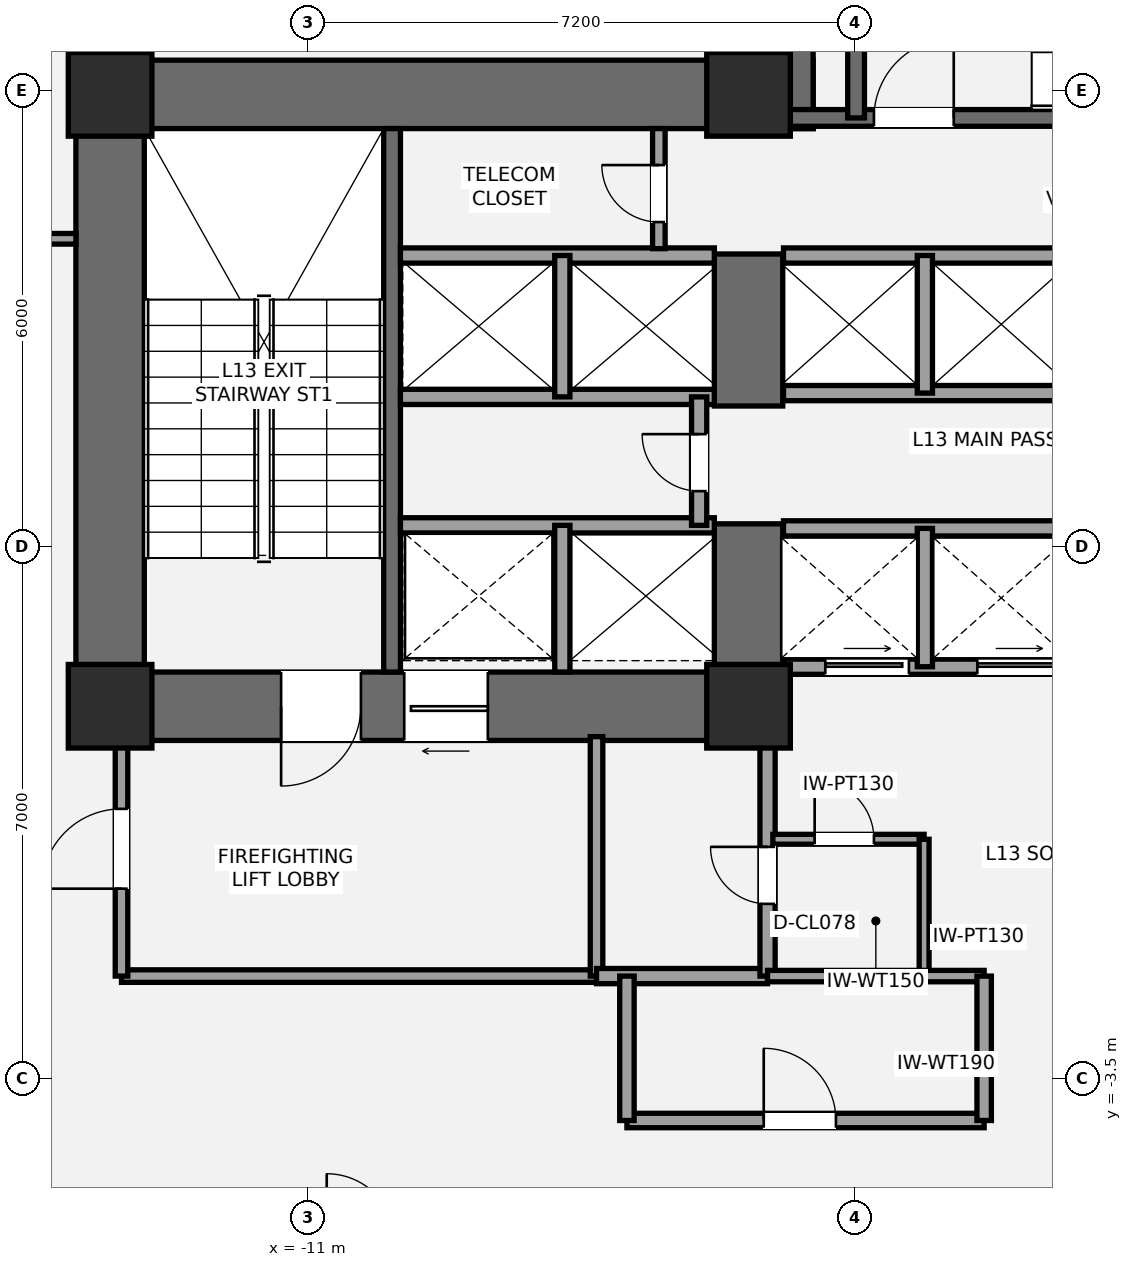
"""IFC4 building model, lengths in metres.
Left out: names, types, materials, properties, quantities, classifications, styles, units other than length and angle.
Written with IfcOpenShell. Run it as: python <this file> out.ifc"""

import sys

from ifc_helpers import new_model, si_unit, direction, frame, frame_2d, origin, origin_2d, place, context, subcontext, project, spatial, rectangle, extrude, element, fill, save


model = new_model("IFC4")
c1 = context("Model", 3, precision=1e-05, world=origin(), true_north=direction((0.0, 1.0)))
c2 = subcontext(c1, "Body", "Model", "MODEL_VIEW")
j1 = project(units=[si_unit("LENGTHUNIT", "METRE"), si_unit("PLANEANGLEUNIT", "RADIAN")], contexts=[c1])
p1 = place(None, origin())
s1 = spatial("IfcSite", under=j1, at=p1, CompositionType="ELEMENT")
p2 = place(p1, origin())
s2 = spatial("IfcBuilding", under=s1, at=p2, CompositionType="ELEMENT")
p3 = place(p2, frame((0.0, 0.0, 52.2)))
s3 = spatial("IfcBuildingStorey", under=s2, at=p3, CompositionType="ELEMENT", Elevation=52.2)
p4 = place(p3, frame((-13.6, 0.95, 0.0), z_axis=(0.0, 0.0, 1.0), x_axis=(0.0, 1.0, 0.0)))
e1 = element("IfcWall", 1, at=p4, inside=s3, PredefinedType="SHEAR", context=c2, shape_type="SweptSolid", body=[
    extrude(rectangle(XDim=8.95, YDim=0.9, at=frame_2d((4.475, 0.0))), origin(), (0.0, 0.0, 1.0), 3.6),
])
p5 = place(p3, frame((-14.05, 9.45, 0.0), z_axis=(0.0, 0.0, 1.0), x_axis=(1.0, 0.0, 0.0)))
e2 = element("IfcWall", 2, at=p5, inside=s3, PredefinedType="SHEAR", context=c2, shape_type="SweptSolid", body=[
    extrude(rectangle(XDim=9.7, YDim=0.9, at=frame_2d((4.85, 0.0))), origin(), (0.0, 0.0, 1.0), 3.6),
])
p6 = place(p3, frame((-4.75, 1.4, 0.0), z_axis=(0.0, 0.0, 1.0), x_axis=(-1.0, 0.0, 0.0)))
e3 = element("IfcWall", 3, at=p6, inside=s3, PredefinedType="SHEAR", context=c2, shape_type="SweptSolid", body=[
    extrude(rectangle(XDim=9.3, YDim=0.9, at=frame_2d((4.65, 0.0))), origin(), (0.0, 0.0, 1.0), 3.6),
])
p7 = place(p6, frame((5.55, 0.0, 0.0)))
e4 = element("IfcOpeningElement", 4, at=p7, cuts=e3, PredefinedType="OPENING", context=c2, shape_type="SweptSolid", body=[
    extrude(rectangle(XDim=1.05, YDim=2.15, at=frame_2d((0.525, 1.075))), frame((0.0, 0.46, 0.0), z_axis=(0.0, -1.0, 0.0), x_axis=(1.0, 0.0, 0.0)), (0.0, 0.0, 1.0), 0.92),
])
p8 = place(p6, frame((3.88, 0.0, 0.0)))
e5 = element("IfcOpeningElement", 5, at=p8, cuts=e3, PredefinedType="OPENING", context=c2, shape_type="SweptSolid", body=[
    extrude(rectangle(XDim=1.1, YDim=2.2, at=frame_2d((0.55, 1.1))), frame((0.0, 0.46, 0.0), z_axis=(0.0, -1.0, 0.0), x_axis=(1.0, 0.0, 0.0)), (0.0, 0.0, 1.0), 0.92),
])
p9 = place(p3, frame((-5.2, 0.95, 0.0), z_axis=(0.0, 0.0, 1.0), x_axis=(0.0, 1.0, 0.0)))
e6 = element("IfcWall", 6, at=p9, inside=s3, PredefinedType="SHEAR", context=c2, shape_type="SweptSolid", body=[
    extrude(rectangle(XDim=2.85, YDim=0.9, at=frame_2d((1.425, 0.0))), origin(), (0.0, 0.0, 1.0), 3.6),
])
p10 = place(p3, frame((-5.2, 5.35, 0.0), z_axis=(0.0, 0.0, 1.0), x_axis=(0.0, 1.0, 0.0)))
e7 = element("IfcWall", 7, at=p10, inside=s3, PredefinedType="SHEAR", context=c2, shape_type="SweptSolid", body=[
    extrude(rectangle(XDim=2.0, YDim=0.9, at=frame_2d((1.0, 0.0))), origin(), (0.0, 0.0, 1.0), 3.6),
])
p11 = place(p3, frame((-9.89, 1.85, 0.0), z_axis=(0.0, 0.0, 1.0), x_axis=(0.0, 1.0, 0.0)))
e8 = element("IfcWall", 8, at=p11, inside=s3, PredefinedType="SHEAR", context=c2, shape_type="SweptSolid", body=[
    extrude(rectangle(XDim=7.15, YDim=0.22, at=frame_2d((3.575, 0.0))), origin(), (0.0, 0.0, 1.0), 3.6),
])
p12 = place(p3, frame((-4.8, 9.0, 0.0), z_axis=(0.0, 0.0, 1.0), x_axis=(0.0, 1.0, 0.0)))
e9 = element("IfcWall", 9, at=p12, inside=s3, PredefinedType="SHEAR", context=c2, shape_type="SweptSolid", body=[
    extrude(rectangle(XDim=4.3, YDim=0.9, at=frame_2d((2.15, 0.0))), origin(), (0.0, 0.0, 1.0), 3.6),
])
p13 = place(p3, frame((-4.7, 9.14, 0.0), z_axis=(0.0, 0.0, 1.0), x_axis=(1.0, 0.0, 0.0)))
e10 = element("IfcWall", 10, at=p13, inside=s3, PredefinedType="SHEAR", context=c2, shape_type="SweptSolid", body=[
    extrude(rectangle(XDim=9.3, YDim=0.22, at=frame_2d((4.65, 0.0))), origin(), (0.0, 0.0, 1.0), 3.6),
])
p14 = place(p13, frame((1.15, 0.0, 0.0)))
e11 = element("IfcOpeningElement", 11, at=p14, cuts=e10, PredefinedType="OPENING", context=c2, shape_type="SweptSolid", body=[
    extrude(rectangle(XDim=1.05, YDim=2.15, at=frame_2d((0.525, 1.075))), frame((0.0, 0.12, 0.0), z_axis=(0.0, -1.0, 0.0), x_axis=(1.0, 0.0, 0.0)), (0.0, 0.0, 1.0), 0.24),
])
p15 = place(p3, frame((-3.785, 9.14, 0.0), z_axis=(0.0, 0.0, 1.0), x_axis=(0.0, 1.0, 0.0)))
e12 = element("IfcWall", 12, at=p15, inside=s3, PredefinedType="SHEAR", context=c2, shape_type="SweptSolid", body=[
    extrude(rectangle(XDim=3.26, YDim=0.22, at=frame_2d((1.63, 0.0))), origin(), (0.0, 0.0, 1.0), 3.6),
])
for number, where, z_axis, x_axis in (
    (13, (-13.6, 1.4, 0.0), (0.0, 0.0, 1.0), (1.0, 0.0, 0.0)),
    (14, (-13.6, 9.45, 0.0), (0.0, 0.0, 1.0), (1.0, 0.0, 0.0)),
    (15, (-5.2, 1.4, 0.0), (0.0, 0.0, 1.0), (1.0, 0.0, 0.0)),
    (16, (-5.2, 9.45, 0.0), (0.0, 0.0, 1.0), (1.0, 0.0, 0.0)),
):
    element("IfcColumn", number, at=place(p3, frame(where, z_axis=z_axis, x_axis=x_axis)), inside=s3, PredefinedType="COLUMN", context=c2, shape_type="SweptSolid", body=[
        extrude(rectangle(XDim=1.1, YDim=1.1, at=origin_2d()), origin(), (0.0, 0.0, 1.0), 3.6),
    ])
p16 = place(p3, frame((-13.45, -2.15, 0.0), z_axis=(0.0, 0.0, 1.0), x_axis=(1.0, 0.0, 0.0)))
e17 = element("IfcWall", 17, at=p16, inside=s3, PredefinedType="PARTITIONING", context=c2, shape_type="SweptSolid", body=[
    extrude(rectangle(XDim=6.25, YDim=0.165, at=frame_2d((3.125, 0.0))), origin(), (0.0, 0.0, 1.0), 3.4),
])
p17 = place(p3, frame((-13.45, -2.15, 0.0), z_axis=(0.0, 0.0, 1.0), x_axis=(0.0, 1.0, 0.0)))
e18 = element("IfcWall", 18, at=p17, inside=s3, PredefinedType="PARTITIONING", context=c2, shape_type="SweptSolid", body=[
    extrude(rectangle(XDim=3.15, YDim=0.165, at=frame_2d((1.575, 0.0))), origin(), (0.0, 0.0, 1.0), 2.853),
])
p18 = place(p17, frame((1.15, 0.0, 0.0)))
e19 = element("IfcOpeningElement", 19, at=p18, cuts=e18, PredefinedType="OPENING", context=c2, shape_type="SweptSolid", body=[
    extrude(rectangle(XDim=1.05, YDim=2.15, at=frame_2d((0.525, 1.075))), frame((0.0, 0.093, 0.0), z_axis=(0.0, -1.0, 0.0), x_axis=(1.0, 0.0, 0.0)), (0.0, 0.0, 1.0), 0.185),
])
p19 = place(p3, frame((-7.2, -2.15, 0.0), z_axis=(0.0, 0.0, 1.0), x_axis=(0.0, 1.0, 0.0)))
e20 = element("IfcWall", 20, at=p19, inside=s3, PredefinedType="PARTITIONING", context=c2, shape_type="SweptSolid", body=[
    extrude(rectangle(XDim=3.15, YDim=0.165, at=frame_2d((1.575, 0.0))), origin(), (0.0, 0.0, 1.0), 2.853),
])
p20 = place(p3, frame((-7.2, -2.15, 0.0), z_axis=(0.0, 0.0, 1.0), x_axis=(1.0, 0.0, 0.0)))
e21 = element("IfcWall", 21, at=p20, inside=s3, PredefinedType="SOLIDWALL", context=c2, shape_type="SweptSolid", body=[
    extrude(rectangle(XDim=2.25, YDim=0.2, at=frame_2d((1.125, 0.0))), origin(), (0.0, 0.0, 1.0), 3.4),
])
p21 = place(p3, frame((-4.95, -2.15, 0.0), z_axis=(0.0, 0.0, 1.0), x_axis=(0.0, 1.0, 0.0)))
e22 = element("IfcWall", 22, at=p21, inside=s3, PredefinedType="SOLIDWALL", context=c2, shape_type="SweptSolid", body=[
    extrude(rectangle(XDim=3.15, YDim=0.2, at=frame_2d((1.575, 0.0))), origin(), (0.0, 0.0, 1.0), 2.853),
])
p22 = place(p21, frame((0.95, 0.0, 0.0)))
e23 = element("IfcOpeningElement", 23, at=p22, cuts=e22, PredefinedType="OPENING", context=c2, shape_type="SweptSolid", body=[
    extrude(rectangle(XDim=0.75, YDim=2.1, at=frame_2d((0.375, 1.05))), frame((0.0, 0.11, 0.0), z_axis=(0.0, -1.0, 0.0), x_axis=(1.0, 0.0, 0.0)), (0.0, 0.0, 1.0), 0.22),
])
p23 = place(p3, frame((-4.88, -0.35, 0.0), z_axis=(0.0, 0.0, 1.0), x_axis=(1.0, 0.0, 0.0)))
e24 = element("IfcWall", 24, at=p23, inside=s3, PredefinedType="PARTITIONING", context=c2, shape_type="SweptSolid", body=[
    extrude(rectangle(XDim=1.99, YDim=0.13, at=frame_2d((0.995, 0.0))), origin(), (0.0, 0.0, 1.0), 3.4),
])
p24 = place(p23, frame((0.55, 0.0, 0.0)))
e25 = element("IfcOpeningElement", 25, at=p24, cuts=e24, PredefinedType="OPENING", context=c2, shape_type="SweptSolid", body=[
    extrude(rectangle(XDim=0.78, YDim=2.1, at=frame_2d((0.39, 1.05))), frame((0.0, 0.075, 0.0), z_axis=(0.0, -1.0, 0.0), x_axis=(1.0, 0.0, 0.0)), (0.0, 0.0, 1.0), 0.15),
])
p25 = place(p3, frame((-2.89, -2.15, 0.0), z_axis=(0.0, 0.0, 1.0), x_axis=(0.0, 1.0, 0.0)))
e26 = element("IfcWall", 26, at=p25, inside=s3, PredefinedType="PARTITIONING", context=c2, shape_type="SweptSolid", body=[
    extrude(rectangle(XDim=1.8, YDim=0.13, at=frame_2d((0.9, 0.0))), origin(), (0.0, 0.0, 1.0), 2.853),
])
p26 = place(p3, frame((-9.78, 3.78, 0.0), z_axis=(0.0, 0.0, 1.0), x_axis=(1.0, 0.0, 0.0)))
e27 = element("IfcWall", 27, at=p26, inside=s3, PredefinedType="SOLIDWALL", context=c2, shape_type="SweptSolid", body=[
    extrude(rectangle(XDim=4.13, YDim=0.2, at=frame_2d((2.065, 0.0))), origin(), (0.0, 0.0, 1.0), 3.4),
])
p27 = place(p3, frame((-7.65, 1.85, 0.0), z_axis=(0.0, 0.0, 1.0), x_axis=(0.0, 1.0, 0.0)))
e28 = element("IfcWall", 28, at=p27, inside=s3, PredefinedType="SOLIDWALL", context=c2, shape_type="SweptSolid", body=[
    extrude(rectangle(XDim=1.93, YDim=0.2, at=frame_2d((0.965, 0.0))), origin(), (0.0, 0.0, 1.0), 3.4),
])
for number, where, z_axis, x_axis in (
    (29, (-9.78, 5.47, 0.0), (0.0, 0.0, 1.0), (1.0, 0.0, 0.0)),
    (30, (-9.78, 7.33, 0.0), (0.0, 0.0, 1.0), (1.0, 0.0, 0.0)),
):
    element("IfcWall", number, at=place(p3, frame(where, z_axis=z_axis, x_axis=x_axis)), inside=s3, PredefinedType="SOLIDWALL", context=c2, shape_type="SweptSolid", body=[
        extrude(rectangle(XDim=4.13, YDim=0.2, at=frame_2d((2.065, 0.0))), origin(), (0.0, 0.0, 1.0), 3.4),
    ])
p28 = place(p3, frame((-7.65, 5.47, 0.0), z_axis=(0.0, 0.0, 1.0), x_axis=(0.0, 1.0, 0.0)))
e31 = element("IfcWall", 31, at=p28, inside=s3, PredefinedType="SOLIDWALL", context=c2, shape_type="SweptSolid", body=[
    extrude(rectangle(XDim=1.86, YDim=0.2, at=frame_2d((0.93, 0.0))), origin(), (0.0, 0.0, 1.0), 3.4),
])
p29 = place(p3, frame((-5.85, 3.78, 0.0), z_axis=(0.0, 0.0, 1.0), x_axis=(0.0, 1.0, 0.0)))
e32 = element("IfcWall", 32, at=p29, inside=s3, PredefinedType="SOLIDWALL", context=c2, shape_type="SweptSolid", body=[
    extrude(rectangle(XDim=1.69, YDim=0.2, at=frame_2d((0.845, 0.0))), origin(), (0.0, 0.0, 1.0), 3.4),
])
p30 = place(p29, frame((0.45, 0.0, 0.0)))
e33 = element("IfcOpeningElement", 33, at=p30, cuts=e32, PredefinedType="OPENING", context=c2, shape_type="SweptSolid", body=[
    extrude(rectangle(XDim=0.75, YDim=2.1, at=frame_2d((0.375, 1.05))), frame((0.0, 0.11, 0.0), z_axis=(0.0, -1.0, 0.0), x_axis=(1.0, 0.0, 0.0)), (0.0, 0.0, 1.0), 0.22),
])
p31 = place(p3, frame((-4.74, 1.92, 0.0), z_axis=(0.0, 0.0, 1.0), x_axis=(1.0, 0.0, 0.0)))
e34 = element("IfcWall", 34, at=p31, inside=s3, PredefinedType="SOLIDWALL", context=c2, shape_type="SweptSolid", body=[
    extrude(rectangle(XDim=3.86, YDim=0.2, at=frame_2d((1.93, 0.0))), origin(), (0.0, 0.0, 1.0), 2.39),
])
p32 = place(p31, frame((0.55, 0.0, 0.0)))
e35 = element("IfcOpeningElement", 35, at=p32, cuts=e34, PredefinedType="OPENING", context=c2, shape_type="SweptSolid", body=[
    extrude(rectangle(XDim=1.1, YDim=2.2, at=frame_2d((0.55, 1.1))), frame((0.0, 0.11, 0.0), z_axis=(0.0, -1.0, 0.0), x_axis=(1.0, 0.0, 0.0)), (0.0, 0.0, 1.0), 0.22),
])
p33 = place(p31, frame((2.55, 0.0, 0.0)))
e36 = element("IfcOpeningElement", 36, at=p33, cuts=e34, PredefinedType="OPENING", context=c2, shape_type="SweptSolid", body=[
    extrude(rectangle(XDim=1.1, YDim=2.2, at=frame_2d((0.55, 1.1))), frame((0.0, 0.11, 0.0), z_axis=(0.0, -1.0, 0.0), x_axis=(1.0, 0.0, 0.0)), (0.0, 0.0, 1.0), 0.22),
])
p34 = place(p3, frame((-4.74, 3.74, 0.0), z_axis=(0.0, 0.0, 1.0), x_axis=(1.0, 0.0, 0.0)))
e37 = element("IfcWall", 37, at=p34, inside=s3, PredefinedType="SOLIDWALL", context=c2, shape_type="SweptSolid", body=[
    extrude(rectangle(XDim=3.86, YDim=0.2, at=frame_2d((1.93, 0.0))), origin(), (0.0, 0.0, 1.0), 3.4),
])
p35 = place(p3, frame((-2.88, 1.92, 0.0), z_axis=(0.0, 0.0, 1.0), x_axis=(0.0, 1.0, 0.0)))
e38 = element("IfcWall", 38, at=p35, inside=s3, PredefinedType="SOLIDWALL", context=c2, shape_type="SweptSolid", body=[
    extrude(rectangle(XDim=1.82, YDim=0.2, at=frame_2d((0.91, 0.0))), origin(), (0.0, 0.0, 1.0), 3.4),
])
for number, where, z_axis, x_axis in (
    (39, (-4.74, 5.52, 0.0), (0.0, 0.0, 1.0), (1.0, 0.0, 0.0)),
    (40, (-4.74, 7.33, 0.0), (0.0, 0.0, 1.0), (1.0, 0.0, 0.0)),
):
    element("IfcWall", number, at=place(p3, frame(where, z_axis=z_axis, x_axis=x_axis)), inside=s3, PredefinedType="SOLIDWALL", context=c2, shape_type="SweptSolid", body=[
        extrude(rectangle(XDim=3.86, YDim=0.2, at=frame_2d((1.93, 0.0))), origin(), (0.0, 0.0, 1.0), 3.4),
    ])
p36 = place(p3, frame((-2.88, 5.52, 0.0), z_axis=(0.0, 0.0, 1.0), x_axis=(0.0, 1.0, 0.0)))
e41 = element("IfcWall", 41, at=p36, inside=s3, PredefinedType="SOLIDWALL", context=c2, shape_type="SweptSolid", body=[
    extrude(rectangle(XDim=1.81, YDim=0.2, at=frame_2d((0.905, 0.0))), origin(), (0.0, 0.0, 1.0), 3.4),
])
p37 = place(p3, frame((-6.38, 7.42, 0.0), z_axis=(0.0, 0.0, 1.0), x_axis=(0.0, 1.0, 0.0)))
e42 = element("IfcWall", 42, at=p37, inside=s3, PredefinedType="PARTITIONING", context=c2, shape_type="SweptSolid", body=[
    extrude(rectangle(XDim=1.58, YDim=0.165, at=frame_2d((0.79, 0.0))), origin(), (0.0, 0.0, 1.0), 3.4),
])
p38 = place(p37, frame((0.35, 0.0, 0.0)))
e43 = element("IfcOpeningElement", 43, at=p38, cuts=e42, PredefinedType="OPENING", context=c2, shape_type="SweptSolid", body=[
    extrude(rectangle(XDim=0.75, YDim=2.1, at=frame_2d((0.375, 1.05))), frame((0.0, 0.093, 0.0), z_axis=(0.0, -1.0, 0.0), x_axis=(1.0, 0.0, 0.0)), (0.0, 0.0, 1.0), 0.185),
])
p39 = place(p3, frame((-6.8, -4.05, 0.0), z_axis=(0.0, 0.0, 1.0), x_axis=(1.0, 0.0, 0.0)))
e44 = element("IfcWall", 44, at=p39, inside=s3, PredefinedType="PLUMBINGWALL", context=c2, shape_type="SweptSolid", body=[
    extrude(rectangle(XDim=4.7, YDim=0.19, at=frame_2d((2.35, 0.0))), origin(), (0.0, 0.0, 1.0), 3.4),
])
p40 = place(p39, frame((1.8, 0.0, 0.0)))
e45 = element("IfcOpeningElement", 45, at=p40, cuts=e44, PredefinedType="OPENING", context=c2, shape_type="SweptSolid", body=[
    extrude(rectangle(XDim=0.95, YDim=2.15, at=frame_2d((0.475, 1.075))), frame((0.0, 0.105, 0.0), z_axis=(0.0, -1.0, 0.0), x_axis=(1.0, 0.0, 0.0)), (0.0, 0.0, 1.0), 0.21),
])
p41 = place(p3, frame((-4.95, -2.15, 0.0), z_axis=(0.0, 0.0, 1.0), x_axis=(1.0, 0.0, 0.0)))
e46 = element("IfcWall", 46, at=p41, inside=s3, PredefinedType="PLUMBINGWALL", context=c2, shape_type="SweptSolid", body=[
    extrude(rectangle(XDim=2.85, YDim=0.15, at=frame_2d((1.425, 0.0))), origin(), (0.0, 0.0, 1.0), 3.4),
])
p42 = place(p3, frame((-6.8, -4.05, 0.0), z_axis=(0.0, 0.0, 1.0), x_axis=(0.0, 1.0, 0.0)))
e47 = element("IfcWall", 47, at=p42, inside=s3, PredefinedType="PLUMBINGWALL", context=c2, shape_type="SweptSolid", body=[
    extrude(rectangle(XDim=1.9, YDim=0.19, at=frame_2d((0.95, 0.0))), origin(), (0.0, 0.0, 1.0), 3.4),
])
p43 = place(p3, frame((-2.1, -4.05, 0.0), z_axis=(0.0, 0.0, 1.0), x_axis=(0.0, 1.0, 0.0)))
e48 = element("IfcWall", 48, at=p43, inside=s3, PredefinedType="PLUMBINGWALL", context=c2, shape_type="SweptSolid", body=[
    extrude(rectangle(XDim=1.9, YDim=0.19, at=frame_2d((0.95, 0.0))), origin(), (0.0, 0.0, 1.0), 2.853),
])
p44 = place(p3, frame((-24.856, 7.55, 0.0), z_axis=(0.0, 0.0, 1.0), x_axis=(1.0, 0.0, 0.0)))
e49 = element("IfcWall", 49, at=p44, inside=s3, PredefinedType="PARTITIONING", context=c2, shape_type="SweptSolid", body=[
    extrude(rectangle(XDim=10.806, YDim=0.14, at=frame_2d((5.403, 0.0))), origin(), (0.0, 0.0, 1.0), 2.853),
])
p45 = place(p44, frame((1.939, 0.0, 0.0)))
e50 = element("IfcOpeningElement", 50, at=p45, cuts=e49, PredefinedType="OPENING", context=c2, shape_type="SweptSolid", body=[
    extrude(rectangle(XDim=0.92, YDim=2.15, at=frame_2d((0.46, 1.075))), frame((0.0, 0.08, 0.0), z_axis=(0.0, -1.0, 0.0), x_axis=(1.0, 0.0, 0.0)), (0.0, 0.0, 1.0), 0.16),
])
p46 = place(p7, origin())
e51 = element("IfcDoor", 51, at=p46, inside=s3, OperationType="SINGLE_SWING_RIGHT", PredefinedType="DOOR", context=c2, shape_type="SweptSolid", body=[
    extrude(rectangle(XDim=1.05, YDim=2.15, at=frame_2d((0.525, 1.075))), frame((0.0, 0.025, 0.0), z_axis=(0.0, -1.0, 0.0), x_axis=(1.0, 0.0, 0.0)), (0.0, 0.0, 1.0), 0.05),
])
fill(e4, e51)
p47 = place(p14, origin())
e52 = element("IfcDoor", 52, at=p47, inside=s3, OperationType="SINGLE_SWING_RIGHT", PredefinedType="DOOR", context=c2, shape_type="SweptSolid", body=[
    extrude(rectangle(XDim=1.05, YDim=2.15, at=frame_2d((0.525, 1.075))), frame((0.0, 0.025, 0.0), z_axis=(0.0, -1.0, 0.0), x_axis=(1.0, 0.0, 0.0)), (0.0, 0.0, 1.0), 0.05),
])
fill(e11, e52)
p48 = place(p18, origin())
e53 = element("IfcDoor", 53, at=p48, inside=s3, OperationType="SINGLE_SWING_LEFT", PredefinedType="DOOR", context=c2, shape_type="SweptSolid", body=[
    extrude(rectangle(XDim=1.05, YDim=2.15, at=frame_2d((0.525, 1.075))), frame((0.0, 0.025, 0.0), z_axis=(0.0, -1.0, 0.0), x_axis=(1.0, 0.0, 0.0)), (0.0, 0.0, 1.0), 0.05),
])
fill(e19, e53)
p49 = place(p22, origin())
e54 = element("IfcDoor", 54, at=p49, inside=s3, OperationType="SINGLE_SWING_RIGHT", PredefinedType="DOOR", context=c2, shape_type="SweptSolid", body=[
    extrude(rectangle(XDim=0.75, YDim=2.1, at=frame_2d((0.375, 1.05))), frame((0.0, 0.025, 0.0), z_axis=(0.0, -1.0, 0.0), x_axis=(1.0, 0.0, 0.0)), (0.0, 0.0, 1.0), 0.05),
])
fill(e23, e54)
p50 = place(p24, origin())
e55 = element("IfcDoor", 55, at=p50, inside=s3, OperationType="SINGLE_SWING_LEFT", PredefinedType="DOOR", context=c2, shape_type="SweptSolid", body=[
    extrude(rectangle(XDim=0.78, YDim=2.1, at=frame_2d((0.39, 1.05))), frame((0.0, 0.025, 0.0), z_axis=(0.0, -1.0, 0.0), x_axis=(1.0, 0.0, 0.0)), (0.0, 0.0, 1.0), 0.05),
])
fill(e25, e55)
p51 = place(p8, origin())
e56 = element("IfcDoor", 56, at=p51, inside=s3, OperationType="SLIDING_TO_LEFT", PredefinedType="DOOR", context=c2, shape_type="SweptSolid", body=[
    extrude(rectangle(XDim=1.1, YDim=2.2, at=frame_2d((0.55, 1.1))), frame((0.0, 0.025, 0.0), z_axis=(0.0, -1.0, 0.0), x_axis=(1.0, 0.0, 0.0)), (0.0, 0.0, 1.0), 0.05),
])
fill(e5, e56)
p52 = place(p30, origin())
e57 = element("IfcDoor", 57, at=p52, inside=s3, OperationType="SINGLE_SWING_RIGHT", PredefinedType="DOOR", context=c2, shape_type="SweptSolid", body=[
    extrude(rectangle(XDim=0.75, YDim=2.1, at=frame_2d((0.375, 1.05))), frame((0.0, 0.025, 0.0), z_axis=(0.0, -1.0, 0.0), x_axis=(1.0, 0.0, 0.0)), (0.0, 0.0, 1.0), 0.05),
])
fill(e33, e57)
p53 = place(p32, origin())
e58 = element("IfcDoor", 58, at=p53, inside=s3, OperationType="SLIDING_TO_LEFT", PredefinedType="DOOR", context=c2, shape_type="SweptSolid", body=[
    extrude(rectangle(XDim=1.1, YDim=2.2, at=frame_2d((0.55, 1.1))), frame((0.0, 0.025, 0.0), z_axis=(0.0, -1.0, 0.0), x_axis=(1.0, 0.0, 0.0)), (0.0, 0.0, 1.0), 0.05),
])
fill(e35, e58)
p54 = place(p33, origin())
e59 = element("IfcDoor", 59, at=p54, inside=s3, OperationType="SLIDING_TO_LEFT", PredefinedType="DOOR", context=c2, shape_type="SweptSolid", body=[
    extrude(rectangle(XDim=1.1, YDim=2.2, at=frame_2d((0.55, 1.1))), frame((0.0, 0.025, 0.0), z_axis=(0.0, -1.0, 0.0), x_axis=(1.0, 0.0, 0.0)), (0.0, 0.0, 1.0), 0.05),
])
fill(e36, e59)
p55 = place(p38, origin())
e60 = element("IfcDoor", 60, at=p55, inside=s3, OperationType="SINGLE_SWING_RIGHT", PredefinedType="DOOR", context=c2, shape_type="SweptSolid", body=[
    extrude(rectangle(XDim=0.75, YDim=2.1, at=frame_2d((0.375, 1.05))), frame((0.0, 0.025, 0.0), z_axis=(0.0, -1.0, 0.0), x_axis=(1.0, 0.0, 0.0)), (0.0, 0.0, 1.0), 0.05),
])
fill(e43, e60)
p56 = place(p40, origin())
e61 = element("IfcDoor", 61, at=p56, inside=s3, OperationType="SINGLE_SWING_LEFT", PredefinedType="DOOR", context=c2, shape_type="SweptSolid", body=[
    extrude(rectangle(XDim=0.95, YDim=2.15, at=frame_2d((0.475, 1.075))), frame((0.0, 0.025, 0.0), z_axis=(0.0, -1.0, 0.0), x_axis=(1.0, 0.0, 0.0)), (0.0, 0.0, 1.0), 0.05),
])
fill(e45, e61)
save(model, sys.argv[1])
